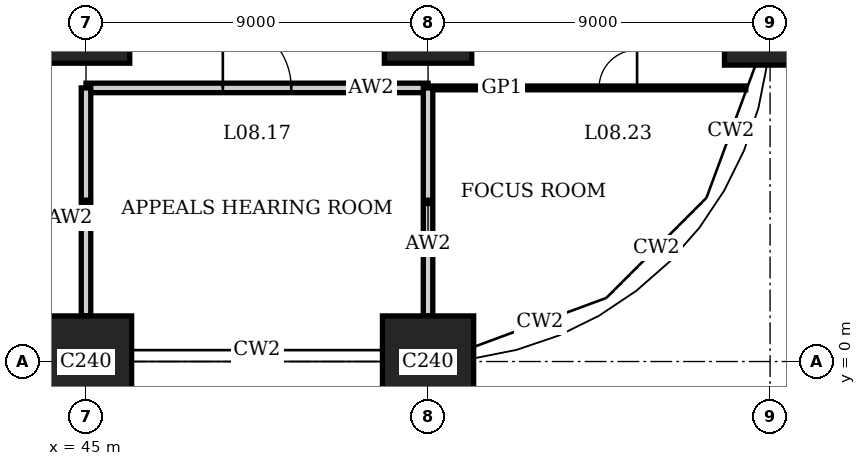
"""IFC4 building model, lengths in metres.
Left out: names, types, materials, properties, quantities, classifications, styles, units other than length and angle.
Written with IfcOpenShell. Run it as: python <this file> out.ifc"""

import sys

from ifc_helpers import new_model, si_unit, direction, frame, frame_2d, origin, origin_2d, place, context, subcontext, project, spatial, rectangle, extrude, element, fill, save


model = new_model("IFC4")
c1 = context("Model", 3, precision=1e-05, world=origin(), true_north=direction((0.0, 1.0)))
c2 = subcontext(c1, "Body", "Model", "MODEL_VIEW")
j1 = project(units=[si_unit("LENGTHUNIT", "METRE"), si_unit("PLANEANGLEUNIT", "RADIAN")], contexts=[c1])
p1 = place(None, origin())
s1 = spatial("IfcSite", under=j1, at=p1, CompositionType="ELEMENT")
p2 = place(p1, origin())
s2 = spatial("IfcBuilding", under=s1, at=p2, CompositionType="ELEMENT")
p3 = place(p2, frame((0.0, 0.0, 35.8)))
s3 = spatial("IfcBuildingStorey", under=s2, at=p3, CompositionType="ELEMENT", Elevation=35.8)
p4 = place(p3, frame((45.0, 0.0, 0.0), z_axis=(0.0, 0.0, 1.0), x_axis=(1.0, 0.0, 0.0)))
e1 = element("IfcColumn", 1, at=p4, inside=s3, PredefinedType="COLUMN", context=c2, shape_type="SweptSolid", body=[
    extrude(rectangle(XDim=2.4, YDim=2.4, at=origin_2d()), origin(), (0.0, 0.0, 1.0), 4.0),
])
p5 = place(p3, frame((45.0, 9.0, 0.0), z_axis=(0.0, 0.0, 1.0), x_axis=(1.0, 0.0, 0.0)))
e2 = element("IfcColumn", 2, at=p5, inside=s3, PredefinedType="COLUMN", context=c2, shape_type="SweptSolid", body=[
    extrude(rectangle(XDim=2.3, YDim=2.3, at=origin_2d()), origin(), (0.0, 0.0, 1.0), 4.0),
])
p6 = place(p3, frame((54.0, 0.0, 0.0), z_axis=(0.0, 0.0, 1.0), x_axis=(1.0, 0.0, 0.0)))
e3 = element("IfcColumn", 3, at=p6, inside=s3, PredefinedType="COLUMN", context=c2, shape_type="SweptSolid", body=[
    extrude(rectangle(XDim=2.4, YDim=2.4, at=origin_2d()), origin(), (0.0, 0.0, 1.0), 4.0),
])
p7 = place(p3, frame((54.0, 9.0, 0.0), z_axis=(0.0, 0.0, 1.0), x_axis=(1.0, 0.0, 0.0)))
e4 = element("IfcColumn", 4, at=p7, inside=s3, PredefinedType="COLUMN", context=c2, shape_type="SweptSolid", body=[
    extrude(rectangle(XDim=2.3, YDim=2.3, at=origin_2d()), origin(), (0.0, 0.0, 1.0), 4.0),
])
p8 = place(p3, frame((63.0, 9.0, 0.0), z_axis=(0.0, 0.0, 1.0), x_axis=(1.0, 0.0, 0.0)))
e5 = element("IfcColumn", 5, at=p8, inside=s3, PredefinedType="COLUMN", context=c2, shape_type="SweptSolid", body=[
    extrude(rectangle(XDim=2.4, YDim=2.4, at=origin_2d()), origin(), (0.0, 0.0, 1.0), 4.0),
])
p9 = place(p3, frame((45.0, 7.2, 0.0), z_axis=(0.0, 0.0, 1.0), x_axis=(1.0, 0.0, 0.0)))
e6 = element("IfcWall", 6, at=p9, inside=s3, PredefinedType="PARTITIONING", context=c2, shape_type="SweptSolid", body=[
    extrude(rectangle(XDim=9.0, YDim=0.25, at=frame_2d((4.5, 0.0))), origin(), (0.0, 0.0, 1.0), 3.75),
])
p10 = place(p9, frame((3.6, 0.0, 0.0)))
e7 = element("IfcOpeningElement", 7, at=p10, cuts=e6, PredefinedType="OPENING", context=c2, shape_type="SweptSolid", body=[
    extrude(rectangle(XDim=1.8, YDim=2.4, at=frame_2d((0.9, 1.2))), frame((0.0, 0.135, 0.0), z_axis=(0.0, -1.0, 0.0), x_axis=(1.0, 0.0, 0.0)), (0.0, 0.0, 1.0), 0.27),
])
p11 = place(p3, frame((54.0, 7.2, 0.0), z_axis=(0.0, 0.0, 1.0), x_axis=(1.0, 0.0, 0.0)))
e8 = element("IfcWall", 8, at=p11, inside=s3, PredefinedType="PARTITIONING", context=c2, shape_type="SweptSolid", body=[
    extrude(rectangle(XDim=8.359, YDim=0.1, at=frame_2d((4.18, 0.0))), origin(), (0.0, 0.0, 1.0), 3.75),
])
p12 = place(p11, frame((4.5, 0.0, 0.0)))
e9 = element("IfcOpeningElement", 9, at=p12, cuts=e8, PredefinedType="OPENING", context=c2, shape_type="SweptSolid", body=[
    extrude(rectangle(XDim=1.0, YDim=2.4, at=frame_2d((0.5, 1.2))), frame((0.0, 0.06, 0.0), z_axis=(0.0, -1.0, 0.0), x_axis=(1.0, 0.0, 0.0)), (0.0, 0.0, 1.0), 0.12),
])
for number, where, z_axis, x_axis in (
    (10, (45.0, 1.2, 0.0), (0.0, 0.0, 1.0), (0.0, 1.0, 0.0)),
    (11, (54.0, 1.2, 0.0), (0.0, 0.0, 1.0), (0.0, 1.0, 0.0)),
):
    element("IfcWall", number, at=place(p3, frame(where, z_axis=z_axis, x_axis=x_axis)), inside=s3, PredefinedType="PARTITIONING", context=c2, shape_type="SweptSolid", body=[
        extrude(rectangle(XDim=6.0, YDim=0.25, at=frame_2d((3.0, 0.0))), origin(), (0.0, 0.0, 1.0), 3.05),
    ])
p13 = place(p10, origin())
e12 = element("IfcDoor", 12, at=p13, inside=s3, OperationType="DOUBLE_DOOR_SINGLE_SWING", PredefinedType="DOOR", context=c2, shape_type="SweptSolid", body=[
    extrude(rectangle(XDim=1.8, YDim=2.4, at=frame_2d((0.9, 1.2))), frame((0.0, 0.025, 0.0), z_axis=(0.0, -1.0, 0.0), x_axis=(1.0, 0.0, 0.0)), (0.0, 0.0, 1.0), 0.05),
])
fill(e7, e12)
p14 = place(p12, origin())
e13 = element("IfcDoor", 13, at=p14, inside=s3, OperationType="SINGLE_SWING_LEFT", PredefinedType="DOOR", context=c2, shape_type="SweptSolid", body=[
    extrude(rectangle(XDim=1.0, YDim=2.4, at=frame_2d((0.5, 1.2))), frame((0.0, 0.02, 0.0), z_axis=(0.0, -1.0, 0.0), x_axis=(1.0, 0.0, 0.0)), (0.0, 0.0, 1.0), 0.04),
])
fill(e9, e13)
save(model, sys.argv[1])
